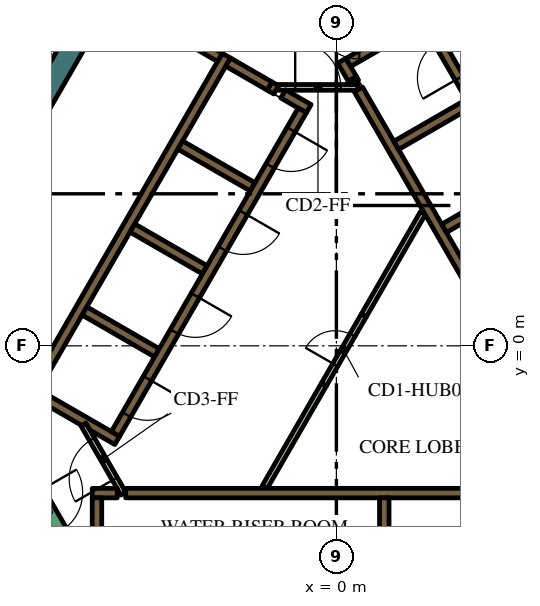
"""IFC4 building model, lengths in metres.
Left out: names, types, materials, properties, quantities, classifications, styles, units other than length and angle.
Written with IfcOpenShell. Run it as: python <this file> out.ifc"""

import sys

from ifc_helpers import new_model, si_unit, direction, frame, frame_2d, origin, place, context, subcontext, project, spatial, polyline, rectangle, outline, extrude, element, fill, save


model = new_model("IFC4")
c1 = context("Model", 3, precision=1e-05, world=origin(), true_north=direction((0.0, 1.0)))
c2 = subcontext(c1, "Body", "Model", "MODEL_VIEW")
j1 = project(units=[si_unit("LENGTHUNIT", "METRE"), si_unit("PLANEANGLEUNIT", "RADIAN")], contexts=[c1])
p1 = place(None, origin())
s1 = spatial("IfcSite", under=j1, at=p1, CompositionType="ELEMENT")
p2 = place(p1, origin())
s2 = spatial("IfcBuilding", under=s1, at=p2, CompositionType="ELEMENT")
p3 = place(p2, frame((0.0, 0.0, 313.2)))
s3 = spatial("IfcBuildingStorey", under=s2, at=p3, CompositionType="ELEMENT", Elevation=313.2)
p4 = place(p3, frame((1.989, 16.456, 0.0), z_axis=(0.0, 0.0, 1.0), x_axis=(0.49999102663, -0.8660305845, 0.0)))
e1 = element("IfcWall", 1, at=p4, inside=s3, PredefinedType="SOLIDWALL", context=c2, shape_type="SweptSolid", body=[
    extrude(rectangle(XDim=12.406, YDim=0.6, at=frame_2d((6.203, 0.0))), origin(), (0.0, 0.0, 1.0), 4.2),
])
p5 = place(p3, frame((-12.582, -1.892, 0.0), z_axis=(0.0, 0.0, 1.0), x_axis=(0.500003640647, 0.866023301845, 0.0)))
e2 = element("IfcWall", 2, at=p5, inside=s3, PredefinedType="SOLIDWALL", context=c2, shape_type="SweptSolid", body=[
    extrude(rectangle(XDim=15.858, YDim=0.6, at=frame_2d((7.929, 0.0))), origin(), (0.0, 0.0, 1.0), 4.2),
])
p6 = place(p3, frame((-5.545, -3.875, 0.0), z_axis=(0.0, 0.0, 1.0), x_axis=(1.0, 0.0, 0.0)))
e3 = element("IfcWall", 3, at=p6, inside=s3, PredefinedType="SOLIDWALL", context=c2, shape_type="SweptSolid", body=[
    extrude(rectangle(XDim=11.97, YDim=0.25, at=frame_2d((5.985, 0.0))), origin(), (0.0, 0.0, 1.0), 4.2),
])
p7 = place(p3, frame((-6.425, -3.875, 0.0), z_axis=(0.0, 0.0, 1.0), x_axis=(1.0, 0.0, 0.0)))
e4 = element("IfcWall", 4, at=p7, inside=s3, PredefinedType="SOLIDWALL", context=c2, shape_type="SweptSolid", body=[
    extrude(rectangle(XDim=0.658, YDim=0.25, at=frame_2d((0.329, 0.0))), origin(), (0.0, 0.0, 1.0), 4.2),
])
p8 = place(p3, frame((1.26, -4.0, 0.0), z_axis=(0.0, 0.0, 1.0), x_axis=(0.0, -1.0, 0.0)))
e5 = element("IfcWall", 5, at=p8, inside=s3, PredefinedType="SOLIDWALL", context=c2, shape_type="SweptSolid", body=[
    extrude(rectangle(XDim=2.2, YDim=0.25, at=frame_2d((1.1, 0.0))), origin(), (0.0, 0.0, 1.0), 4.2),
])
p9 = place(p3, frame((-6.3, -7.125, 0.0), z_axis=(0.0, 0.0, 1.0), x_axis=(0.0, 1.0, 0.0)))
e6 = element("IfcWall", 6, at=p9, inside=s3, PredefinedType="SOLIDWALL", context=c2, shape_type="SweptSolid", body=[
    extrude(rectangle(XDim=3.125, YDim=0.25, at=frame_2d((1.562, 0.0))), origin(), (0.0, 0.0, 1.0), 4.2),
])
p10 = place(p3, frame((0.473, 6.93, 0.0), z_axis=(0.0, 0.0, 1.0), x_axis=(-0.49972245349, 0.866185586049, 0.0)))
e7 = element("IfcWall", 7, at=p10, inside=s3, PredefinedType="SOLIDWALL", context=c2, shape_type="SweptSolid", body=[
    extrude(rectangle(XDim=0.11, YDim=0.25, at=frame_2d((0.055, 0.0))), origin(), (0.0, 0.0, 1.0), 4.2),
])
p11 = place(p3, frame((6.568, -3.627, 0.0), z_axis=(0.0, 0.0, 1.0), x_axis=(-0.499999455981, 0.866025717874, 0.0)))
e8 = element("IfcWall", 8, at=p11, inside=s3, PredefinedType="SOLIDWALL", context=c2, shape_type="SweptSolid", body=[
    extrude(rectangle(XDim=11.978, YDim=0.25, at=frame_2d((5.989, 0.0))), origin(), (0.0, 0.0, 1.0), 4.2),
])
p12 = place(p3, frame((0.417, 7.027, 0.0), z_axis=(0.0, 0.0, 1.0), x_axis=(-0.500210807569, 0.865903659763, 0.0)))
e9 = element("IfcWall", 9, at=p12, inside=s3, PredefinedType="SOLIDWALL", context=c2, shape_type="SweptSolid", body=[
    extrude(rectangle(XDim=0.548, YDim=0.25, at=frame_2d((0.274, 0.0))), origin(), (0.0, 0.0, 1.0), 4.2),
])
p13 = place(p3, frame((3.1, 9.064, 0.0), z_axis=(0.0, 0.0, 1.0), x_axis=(-0.866030133475, -0.499991807846, 0.0)))
e10 = element("IfcWall", 10, at=p13, inside=s3, PredefinedType="SOLIDWALL", context=c2, shape_type="SweptSolid", body=[
    extrude(rectangle(XDim=3.217, YDim=0.25, at=frame_2d((1.608, 0.0))), origin(), (0.0, 0.0, 1.0), 4.2),
])
p14 = place(p3, frame((1.574, 5.274, 0.0), z_axis=(0.0, 0.0, 1.0), x_axis=(0.866028486751, 0.499994660107, 0.0)))
e11 = element("IfcWall", 11, at=p14, inside=s3, PredefinedType="SOLIDWALL", context=c2, shape_type="SweptSolid", body=[
    extrude(rectangle(XDim=2.2, YDim=0.25, at=frame_2d((1.1, 0.0))), origin(), (0.0, 0.0, 1.0), 4.2),
])
p15 = place(p3, frame((2.834, 3.091, 0.0), z_axis=(0.0, 0.0, 1.0), x_axis=(0.866008176907, 0.50002983664, 0.0)))
e12 = element("IfcWall", 12, at=p15, inside=s3, PredefinedType="SOLIDWALL", context=c2, shape_type="SweptSolid", body=[
    extrude(rectangle(XDim=2.2, YDim=0.25, at=frame_2d((1.1, 0.0))), origin(), (0.0, 0.0, 1.0), 4.2),
])
p16 = place(p3, frame((-8.06, -1.311, 0.0), z_axis=(0.0, 0.0, 1.0), x_axis=(0.50000273126, 0.866023826885, 0.0)))
e13 = element("IfcWall", 13, at=p16, inside=s3, PredefinedType="SOLIDWALL", context=c2, shape_type="SweptSolid", body=[
    extrude(rectangle(XDim=10.33, YDim=0.25, at=frame_2d((5.165, 0.0))), origin(), (0.0, 0.0, 1.0), 4.2),
])
p17 = place(p3, frame((-1.758, 6.835, 0.0), z_axis=(0.0, 0.0, 1.0), x_axis=(0.865982457891, -0.500074377092, 0.0)))
e14 = element("IfcWall", 14, at=p17, inside=s3, PredefinedType="SOLIDWALL", context=c2, shape_type="SweptSolid", body=[
    extrude(rectangle(XDim=0.2, YDim=0.25, at=frame_2d((0.1, 0.0))), origin(), (0.0, 0.0, 1.0), 4.2),
])
p18 = place(p3, frame((-1.76, 6.836, 0.0), z_axis=(0.0, 0.0, 1.0), x_axis=(-0.865952863304, 0.500125622755, 0.0)))
e15 = element("IfcWall", 15, at=p18, inside=s3, PredefinedType="SOLIDWALL", context=c2, shape_type="SweptSolid", body=[
    extrude(rectangle(XDim=1.258, YDim=0.25, at=frame_2d((0.629, 0.0))), origin(), (0.0, 0.0, 1.0), 4.2),
])
p19 = place(p3, frame((-0.728, 6.24, 0.0), z_axis=(0.0, 0.0, 1.0), x_axis=(-0.865955664968, 0.500120771724, 0.0)))
e16 = element("IfcWall", 16, at=p19, inside=s3, PredefinedType="SOLIDWALL", context=c2, shape_type="SweptSolid", body=[
    extrude(rectangle(XDim=0.778, YDim=0.25, at=frame_2d((0.389, 0.0))), origin(), (0.0, 0.0, 1.0), 4.2),
])
for number, where, z_axis, x_axis in (
    (17, (-2.204, 4.182, 0.0), (0.0, 0.0, 1.0), (-0.866, 0.5, 0.0)),
    (18, (-5.369, 3.1, 0.0), (0.0, 0.0, 1.0), (0.866, -0.5, 0.0)),
    (19, (-4.724, -0.182, 0.0), (0.0, 0.0, 1.0), (-0.866, 0.5, 0.0)),
):
    element("IfcWall", number, at=place(p3, frame(where, z_axis=z_axis, x_axis=x_axis)), inside=s3, PredefinedType="SOLIDWALL", context=c2, shape_type="SweptSolid", body=[
        extrude(rectangle(XDim=2.2, YDim=0.25, at=frame_2d((1.1, 0.0))), origin(), (0.0, 0.0, 1.0), 4.2),
    ])
p20 = place(p3, origin())
e20 = element("IfcWall", 20, at=p20, inside=s3, PredefinedType="SOLIDWALL", context=c2, shape_type="SweptSolid", body=[
    extrude(outline(polyline([(-5.922, -2.257), (-5.922, -2.257), (-5.705, -2.382), (-5.83, -2.598), (-6.483, -2.221), (-6.591, -2.033), (-6.591, -2.033), (-6.7, -2.096), (-7.952, -1.373), (-7.827, -1.156), (-5.922, -2.257)])), origin(), (0.0, 0.0, 1.0), 4.2),
])
p21 = place(p3, frame((-3.066, 7.59, 0.0), z_axis=(0.0, 0.0, 1.0), x_axis=(-0.866081358704, 0.49990307071, 0.0)))
e21 = element("IfcWall", 21, at=p21, inside=s3, PredefinedType="SOLIDWALL", context=c2, shape_type="SweptSolid", body=[
    extrude(rectangle(XDim=0.858, YDim=0.25, at=frame_2d((0.429, 0.0))), origin(), (0.0, 0.0, 1.0), 4.2),
])
p22 = place(p3, frame((-1.887, -3.718, 0.0), z_axis=(0.0, 0.0, 1.0), x_axis=(0.500043732237, 0.866000153493, 0.0)))
e22 = element("IfcWall", 22, at=p22, inside=s3, PredefinedType="PARTITIONING", context=c2, shape_type="SweptSolid", body=[
    extrude(rectangle(XDim=3.114, YDim=0.15, at=frame_2d((1.557, 0.0))), origin(), (0.0, 0.0, 1.0), 3.55),
])
p23 = place(p3, frame((0.72, 0.797, 0.0), z_axis=(0.0, 0.0, 1.0), x_axis=(0.499984921984, 0.866034108906, 0.0)))
e23 = element("IfcWall", 23, at=p23, inside=s3, PredefinedType="PARTITIONING", context=c2, shape_type="SweptSolid", body=[
    extrude(rectangle(XDim=3.113, YDim=0.15, at=frame_2d((1.557, 0.0))), origin(), (0.0, 0.0, 1.0), 3.55),
])
p24 = place(p3, frame((8.565, -2.185, 0.0), z_axis=(0.0, 0.0, 1.0), x_axis=(-0.499997954832, 0.866026584559, 0.0)))
e24 = element("IfcWall", 24, at=p24, inside=s3, PredefinedType="SOLIDWALL", context=c2, shape_type="SweptSolid", body=[
    extrude(rectangle(XDim=12.35, YDim=0.25, at=frame_2d((6.175, 0.0))), origin(), (0.0, 0.0, 1.0), 4.2),
])
p25 = place(p24, frame((0.685, 0.0, 0.0)))
e25 = element("IfcOpeningElement", 25, at=p25, cuts=e24, PredefinedType="OPENING", context=c2, shape_type="SweptSolid", body=[
    extrude(rectangle(XDim=0.9, YDim=2.1, at=frame_2d((0.45, 1.05))), frame((0.0, 0.135, 0.0), z_axis=(0.0, -1.0, 0.0), x_axis=(1.0, 0.0, 0.0)), (0.0, 0.0, 1.0), 0.27),
])
p26 = place(p24, frame((3.105, 0.0, 0.0)))
e26 = element("IfcOpeningElement", 26, at=p26, cuts=e24, PredefinedType="OPENING", context=c2, shape_type="SweptSolid", body=[
    extrude(rectangle(XDim=1.1, YDim=2.1, at=frame_2d((0.55, 1.05))), frame((0.0, 0.135, 0.0), z_axis=(0.0, -1.0, 0.0), x_axis=(1.0, 0.0, 0.0)), (0.0, 0.0, 1.0), 0.27),
])
p27 = place(p24, frame((5.625, 0.0, 0.0)))
e27 = element("IfcOpeningElement", 27, at=p27, cuts=e24, PredefinedType="OPENING", context=c2, shape_type="SweptSolid", body=[
    extrude(rectangle(XDim=1.1, YDim=2.1, at=frame_2d((0.55, 1.05))), frame((0.0, 0.135, 0.0), z_axis=(0.0, -1.0, 0.0), x_axis=(1.0, 0.0, 0.0)), (0.0, 0.0, 1.0), 0.27),
])
p28 = place(p24, frame((8.145, 0.0, 0.0)))
e28 = element("IfcOpeningElement", 28, at=p28, cuts=e24, PredefinedType="OPENING", context=c2, shape_type="SweptSolid", body=[
    extrude(rectangle(XDim=1.1, YDim=2.1, at=frame_2d((0.55, 1.05))), frame((0.0, 0.135, 0.0), z_axis=(0.0, -1.0, 0.0), x_axis=(1.0, 0.0, 0.0)), (0.0, 0.0, 1.0), 0.27),
])
p29 = place(p24, frame((10.665, 0.0, 0.0)))
e29 = element("IfcOpeningElement", 29, at=p29, cuts=e24, PredefinedType="OPENING", context=c2, shape_type="SweptSolid", body=[
    extrude(rectangle(XDim=1.1, YDim=2.1, at=frame_2d((0.55, 1.05))), frame((0.0, 0.135, 0.0), z_axis=(0.0, -1.0, 0.0), x_axis=(1.0, 0.0, 0.0)), (0.0, 0.0, 1.0), 0.27),
])
p30 = place(p3, frame((-0.898, 6.194, 0.0), z_axis=(0.0, 0.0, 1.0), x_axis=(-0.499996202215, -0.866027596426, 0.0)))
e30 = element("IfcWall", 30, at=p30, inside=s3, PredefinedType="SOLIDWALL", context=c2, shape_type="SweptSolid", body=[
    extrude(rectangle(XDim=9.83, YDim=0.25, at=frame_2d((4.915, 0.0))), origin(), (0.0, 0.0, 1.0), 4.2),
])
p31 = place(p30, frame((0.585, 0.0, 0.0)))
e31 = element("IfcOpeningElement", 31, at=p31, cuts=e30, PredefinedType="OPENING", context=c2, shape_type="SweptSolid", body=[
    extrude(rectangle(XDim=1.1, YDim=2.1, at=frame_2d((0.55, 1.05))), frame((0.0, 0.135, 0.0), z_axis=(0.0, -1.0, 0.0), x_axis=(1.0, 0.0, 0.0)), (0.0, 0.0, 1.0), 0.27),
])
p32 = place(p30, frame((3.105, 0.0, 0.0)))
e32 = element("IfcOpeningElement", 32, at=p32, cuts=e30, PredefinedType="OPENING", context=c2, shape_type="SweptSolid", body=[
    extrude(rectangle(XDim=1.1, YDim=2.1, at=frame_2d((0.55, 1.05))), frame((0.0, 0.135, 0.0), z_axis=(0.0, -1.0, 0.0), x_axis=(1.0, 0.0, 0.0)), (0.0, 0.0, 1.0), 0.27),
])
p33 = place(p30, frame((5.625, 0.0, 0.0)))
e33 = element("IfcOpeningElement", 33, at=p33, cuts=e30, PredefinedType="OPENING", context=c2, shape_type="SweptSolid", body=[
    extrude(rectangle(XDim=1.1, YDim=2.1, at=frame_2d((0.55, 1.05))), frame((0.0, 0.135, 0.0), z_axis=(0.0, -1.0, 0.0), x_axis=(1.0, 0.0, 0.0)), (0.0, 0.0, 1.0), 0.27),
])
p34 = place(p30, frame((8.145, 0.0, 0.0)))
e34 = element("IfcOpeningElement", 34, at=p34, cuts=e30, PredefinedType="OPENING", context=c2, shape_type="SweptSolid", body=[
    extrude(rectangle(XDim=1.1, YDim=2.1, at=frame_2d((0.55, 1.05))), frame((0.0, 0.135, 0.0), z_axis=(0.0, -1.0, 0.0), x_axis=(1.0, 0.0, 0.0)), (0.0, 0.0, 1.0), 0.27),
])
p35 = place(p3, frame((-8.103, -3.466, 0.0), z_axis=(0.0, 0.0, 1.0), x_axis=(0.500078061341, -0.865980330357, 0.0)))
e35 = element("IfcWall", 35, at=p35, inside=s3, PredefinedType="SOLIDWALL", context=c2, shape_type="SweptSolid", body=[
    extrude(rectangle(XDim=2.1, YDim=0.4, at=frame_2d((1.05, 0.0))), origin(), (0.0, 0.0, 1.0), 4.2),
])
p36 = place(p35, frame((0.45, 0.0, 0.0)))
e36 = element("IfcOpeningElement", 36, at=p36, cuts=e35, PredefinedType="OPENING", context=c2, shape_type="SweptSolid", body=[
    extrude(rectangle(XDim=1.2, YDim=2.1, at=frame_2d((0.6, 1.05))), frame((0.0, 0.21, 0.0), z_axis=(0.0, -1.0, 0.0), x_axis=(1.0, 0.0, 0.0)), (0.0, 0.0, 1.0), 0.42),
])
p37 = place(p3, frame((-0.33, -1.022, 0.0), z_axis=(0.0, 0.0, 1.0), x_axis=(0.500027713859, 0.866009402589, 0.0)))
e37 = element("IfcWall", 37, at=p37, inside=s3, PredefinedType="PARTITIONING", context=c2, shape_type="SweptSolid", body=[
    extrude(rectangle(XDim=2.1, YDim=0.15, at=frame_2d((1.05, 0.0))), origin(), (0.0, 0.0, 1.0), 3.55),
])
p38 = place(p37, frame((0.6, 0.0, 0.0)))
e38 = element("IfcOpeningElement", 38, at=p38, cuts=e37, PredefinedType="OPENING", context=c2, shape_type="SweptSolid", body=[
    extrude(rectangle(XDim=0.9, YDim=2.1, at=frame_2d((0.45, 1.05))), frame((0.0, 0.085, 0.0), z_axis=(0.0, -1.0, 0.0), x_axis=(1.0, 0.0, 0.0)), (0.0, 0.0, 1.0), 0.17),
])
p39 = place(p3, frame((-1.534, 6.8, 0.0), z_axis=(0.0, 0.0, 1.0), x_axis=(1.0, 0.0, 0.0)))
e39 = element("IfcWall", 39, at=p39, inside=s3, PredefinedType="PARTITIONING", context=c2, shape_type="SweptSolid", body=[
    extrude(rectangle(XDim=2.1, YDim=0.15, at=frame_2d((1.05, 0.0))), origin(), (0.0, 0.0, 1.0), 3.55),
])
p40 = place(p39, frame((0.45, 0.0, 0.0)))
e40 = element("IfcOpeningElement", 40, at=p40, cuts=e39, PredefinedType="OPENING", context=c2, shape_type="SweptSolid", body=[
    extrude(rectangle(XDim=1.2, YDim=2.1, at=frame_2d((0.6, 1.05))), frame((0.0, 0.085, 0.0), z_axis=(0.0, -1.0, 0.0), x_axis=(1.0, 0.0, 0.0)), (0.0, 0.0, 1.0), 0.17),
])
p41 = place(p3, frame((-5.606, -3.89, 0.0), z_axis=(0.0, 0.0, 1.0), x_axis=(-0.500027713859, 0.866009402589, 0.0)))
e41 = element("IfcWall", 41, at=p41, inside=s3, PredefinedType="PARTITIONING", context=c2, shape_type="SweptSolid", body=[
    extrude(rectangle(XDim=2.1, YDim=0.15, at=frame_2d((1.05, 0.0))), origin(), (0.0, 0.0, 1.0), 3.55),
])
p42 = place(p41, frame((0.45, 0.0, 0.0)))
e42 = element("IfcOpeningElement", 42, at=p42, cuts=e41, PredefinedType="OPENING", context=c2, shape_type="SweptSolid", body=[
    extrude(rectangle(XDim=1.2, YDim=2.1, at=frame_2d((0.6, 1.05))), frame((0.0, 0.085, 0.0), z_axis=(0.0, -1.0, 0.0), x_axis=(1.0, 0.0, 0.0)), (0.0, 0.0, 1.0), 0.17),
])
p43 = place(p29, origin())
e43 = element("IfcDoor", 43, at=p43, inside=s3, OperationType="DOUBLE_DOOR_SLIDING", PredefinedType="DOOR", context=c2, shape_type="SweptSolid", body=[
    extrude(rectangle(XDim=1.1, YDim=2.1, at=frame_2d((0.55, 1.05))), frame((0.0, 0.025, 0.0), z_axis=(0.0, -1.0, 0.0), x_axis=(1.0, 0.0, 0.0)), (0.0, 0.0, 1.0), 0.05),
])
fill(e29, e43)
p44 = place(p31, origin())
e44 = element("IfcDoor", 44, at=p44, inside=s3, OperationType="DOUBLE_DOOR_SLIDING", PredefinedType="DOOR", context=c2, shape_type="SweptSolid", body=[
    extrude(rectangle(XDim=1.1, YDim=2.1, at=frame_2d((0.55, 1.05))), frame((0.0, 0.025, 0.0), z_axis=(0.0, -1.0, 0.0), x_axis=(1.0, 0.0, 0.0)), (0.0, 0.0, 1.0), 0.05),
])
fill(e31, e44)
p45 = place(p32, origin())
e45 = element("IfcDoor", 45, at=p45, inside=s3, OperationType="DOUBLE_DOOR_SLIDING", PredefinedType="DOOR", context=c2, shape_type="SweptSolid", body=[
    extrude(rectangle(XDim=1.1, YDim=2.1, at=frame_2d((0.55, 1.05))), frame((0.0, 0.025, 0.0), z_axis=(0.0, -1.0, 0.0), x_axis=(1.0, 0.0, 0.0)), (0.0, 0.0, 1.0), 0.05),
])
fill(e32, e45)
p46 = place(p33, origin())
e46 = element("IfcDoor", 46, at=p46, inside=s3, OperationType="DOUBLE_DOOR_SLIDING", PredefinedType="DOOR", context=c2, shape_type="SweptSolid", body=[
    extrude(rectangle(XDim=1.1, YDim=2.1, at=frame_2d((0.55, 1.05))), frame((0.0, 0.025, 0.0), z_axis=(0.0, -1.0, 0.0), x_axis=(1.0, 0.0, 0.0)), (0.0, 0.0, 1.0), 0.05),
])
fill(e33, e46)
p47 = place(p34, origin())
e47 = element("IfcDoor", 47, at=p47, inside=s3, OperationType="DOUBLE_DOOR_SLIDING", PredefinedType="DOOR", context=c2, shape_type="SweptSolid", body=[
    extrude(rectangle(XDim=1.1, YDim=2.1, at=frame_2d((0.55, 1.05))), frame((0.0, 0.025, 0.0), z_axis=(0.0, -1.0, 0.0), x_axis=(1.0, 0.0, 0.0)), (0.0, 0.0, 1.0), 0.05),
])
fill(e34, e47)
p48 = place(p36, origin())
e48 = element("IfcDoor", 48, at=p48, inside=s3, OperationType="SINGLE_SWING_LEFT", PredefinedType="DOOR", context=c2, shape_type="SweptSolid", body=[
    extrude(rectangle(XDim=1.2, YDim=2.1, at=frame_2d((0.6, 1.05))), frame((0.0, 0.025, 0.0), z_axis=(0.0, -1.0, 0.0), x_axis=(1.0, 0.0, 0.0)), (0.0, 0.0, 1.0), 0.05),
])
fill(e36, e48)
p49 = place(p38, origin())
e49 = element("IfcDoor", 49, at=p49, inside=s3, OperationType="SINGLE_SWING_LEFT", PredefinedType="DOOR", context=c2, shape_type="SweptSolid", body=[
    extrude(rectangle(XDim=0.9, YDim=2.1, at=frame_2d((0.45, 1.05))), frame((0.0, 0.025, 0.0), z_axis=(0.0, -1.0, 0.0), x_axis=(1.0, 0.0, 0.0)), (0.0, 0.0, 1.0), 0.05),
])
fill(e38, e49)
p50 = place(p40, origin())
e50 = element("IfcDoor", 50, at=p50, inside=s3, OperationType="SINGLE_SWING_LEFT", PredefinedType="DOOR", context=c2, shape_type="SweptSolid", body=[
    extrude(rectangle(XDim=1.2, YDim=2.1, at=frame_2d((0.6, 1.05))), frame((0.0, 0.025, 0.0), z_axis=(0.0, -1.0, 0.0), x_axis=(1.0, 0.0, 0.0)), (0.0, 0.0, 1.0), 0.05),
])
fill(e40, e50)
p51 = place(p42, origin())
e51 = element("IfcDoor", 51, at=p51, inside=s3, OperationType="SINGLE_SWING_LEFT", PredefinedType="DOOR", context=c2, shape_type="SweptSolid", body=[
    extrude(rectangle(XDim=1.2, YDim=2.1, at=frame_2d((0.6, 1.05))), frame((0.0, 0.025, 0.0), z_axis=(0.0, -1.0, 0.0), x_axis=(1.0, 0.0, 0.0)), (0.0, 0.0, 1.0), 0.05),
])
fill(e42, e51)
save(model, sys.argv[1])
